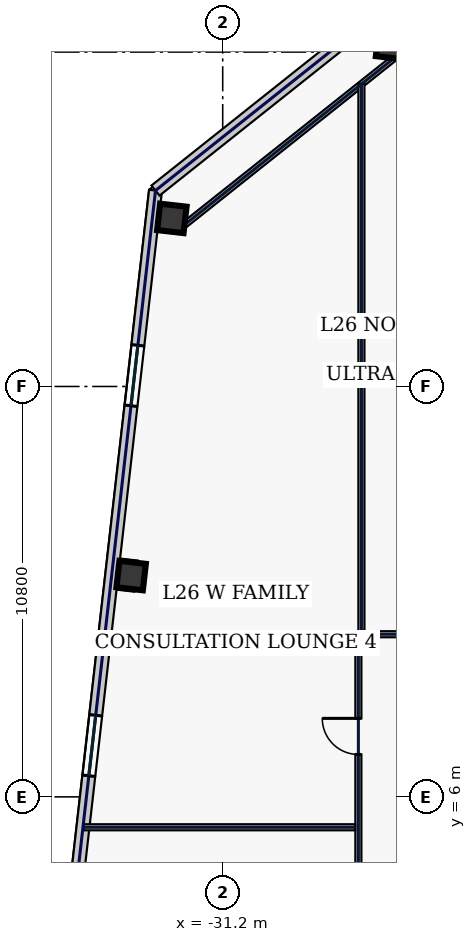
"""IFC4 building model, lengths in metres.
Left out: names, types, materials, properties, quantities, classifications, styles, units other than length and angle.
Written with IfcOpenShell. Run it as: python <this file> out.ifc"""

import sys

from ifc_helpers import new_model, si_unit, direction, frame, frame_2d, origin, origin_2d, place, context, subcontext, project, spatial, rectangle, hollow_rectangle, extrude, element, fill, save


model = new_model("IFC4")
c1 = context("Model", 3, precision=1e-05, world=origin(), true_north=direction((0.0, 1.0)))
c2 = subcontext(c1, "Body", "Model", "MODEL_VIEW")
j1 = project(units=[si_unit("LENGTHUNIT", "METRE"), si_unit("PLANEANGLEUNIT", "RADIAN")], contexts=[c1])
p1 = place(None, origin())
s1 = spatial("IfcSite", under=j1, at=p1, CompositionType="ELEMENT")
p2 = place(p1, origin())
s2 = spatial("IfcBuilding", under=s1, at=p2, CompositionType="ELEMENT")
p3 = place(p2, frame((0.0, 0.0, 117.4)))
s3 = spatial("IfcBuildingStorey", under=s2, at=p3, CompositionType="ELEMENT", Elevation=117.4)
for number, where, z_axis, x_axis in (
    (1, (-26.783, 25.801, 0.0), (0.0, 0.0, 1.0), (0.994, -0.113, 0.0)),
    (2, (-32.538, 21.223, 0.0), (0.0, 0.0, 1.0), (0.994, -0.113, 0.0)),
    (3, (-33.609, 11.824, 0.0), (0.0, 0.0, 1.0), (0.994, -0.113, 0.0)),
):
    element("IfcColumn", number, at=place(p3, frame(where, z_axis=z_axis, x_axis=x_axis)), inside=s3, PredefinedType="COLUMN", context=c2, shape_type="SweptSolid", body=[
        extrude(hollow_rectangle(XDim=0.7, YDim=0.7, WallThickness=0.032, at=origin_2d()), origin(), (0.0, 0.0, 1.0), 3.74),
    ])
p4 = place(p3, frame((-6.314, 23.982, 0.0), z_axis=(0.0, 0.0, 1.0), x_axis=(-0.993571362037, 0.113207546299, 0.0)))
e4 = element("IfcWall", 4, at=p4, inside=s3, PredefinedType="STANDARD", context=c2, shape_type="SweptSolid", body=[
    extrude(rectangle(XDim=21.223, YDim=0.34, at=frame_2d((10.611, 0.0))), origin(), (0.0, 0.0, 1.0), 3.74),
])
p5 = place(p4, frame((17.265, 0.0, 0.22)))
e5 = element("IfcOpeningElement", 5, at=p5, cuts=e4, PredefinedType="OPENING", context=c2, shape_type="SweptSolid", body=[
    extrude(rectangle(XDim=1.6, YDim=1.2, at=frame_2d((0.8, 0.6))), frame((0.0, 0.18, 0.0), z_axis=(0.0, -1.0, 0.0), x_axis=(1.0, 0.0, 0.0)), (0.0, 0.0, 1.0), 0.36),
])
p6 = place(p4, frame((12.794, 0.0, 0.67)))
e6 = element("IfcOpeningElement", 6, at=p6, cuts=e4, PredefinedType="OPENING", context=c2, shape_type="SweptSolid", body=[
    extrude(rectangle(XDim=2.1, YDim=2.2, at=frame_2d((1.05, 1.1))), frame((0.0, 0.18, 0.0), z_axis=(0.0, -1.0, 0.0), x_axis=(1.0, 0.0, 0.0)), (0.0, 0.0, 1.0), 0.36),
])
p7 = place(p4, frame((3.616, 0.0, 0.67)))
e7 = element("IfcOpeningElement", 7, at=p7, cuts=e4, PredefinedType="OPENING", context=c2, shape_type="SweptSolid", body=[
    extrude(rectangle(XDim=2.1, YDim=2.2, at=frame_2d((1.05, 1.1))), frame((0.0, 0.18, 0.0), z_axis=(0.0, -1.0, 0.0), x_axis=(1.0, 0.0, 0.0)), (0.0, 0.0, 1.0), 0.36),
])
p8 = place(p3, frame((-32.968, 21.957, 0.0), z_axis=(0.0, 0.0, 1.0), x_axis=(-0.113201605824, -0.993572038877, 0.0)))
e8 = element("IfcWall", 8, at=p8, inside=s3, PredefinedType="STANDARD", context=c2, shape_type="SweptSolid", body=[
    extrude(rectangle(XDim=39.2, YDim=0.34, at=frame_2d((19.6, 0.0))), origin(), (0.0, 0.0, 1.0), 3.74),
])
p9 = place(p8, frame((4.1, 0.0, 0.58)))
e9 = element("IfcOpeningElement", 9, at=p9, cuts=e8, PredefinedType="OPENING", context=c2, shape_type="SweptSolid", body=[
    extrude(rectangle(XDim=1.6, YDim=2.3, at=frame_2d((0.8, 1.15))), frame((0.0, 0.18, 0.0), z_axis=(0.0, -1.0, 0.0), x_axis=(1.0, 0.0, 0.0)), (0.0, 0.0, 1.0), 0.36),
])
p10 = place(p8, frame((13.9, 0.0, 0.58)))
e10 = element("IfcOpeningElement", 10, at=p10, cuts=e8, PredefinedType="OPENING", context=c2, shape_type="SweptSolid", body=[
    extrude(rectangle(XDim=1.6, YDim=2.3, at=frame_2d((0.8, 1.15))), frame((0.0, 0.18, 0.0), z_axis=(0.0, -1.0, 0.0), x_axis=(1.0, 0.0, 0.0)), (0.0, 0.0, 1.0), 0.36),
])
p11 = place(p8, frame((23.7, 0.0, 0.58)))
e11 = element("IfcOpeningElement", 11, at=p11, cuts=e8, PredefinedType="OPENING", context=c2, shape_type="SweptSolid", body=[
    extrude(rectangle(XDim=1.6, YDim=2.3, at=frame_2d((0.8, 1.15))), frame((0.0, 0.18, 0.0), z_axis=(0.0, -1.0, 0.0), x_axis=(1.0, 0.0, 0.0)), (0.0, 0.0, 1.0), 0.36),
])
p12 = place(p8, frame((33.5, 0.0, 0.58)))
e12 = element("IfcOpeningElement", 12, at=p12, cuts=e8, PredefinedType="OPENING", context=c2, shape_type="SweptSolid", body=[
    extrude(rectangle(XDim=1.6, YDim=2.3, at=frame_2d((0.8, 1.15))), frame((0.0, 0.18, 0.0), z_axis=(0.0, -1.0, 0.0), x_axis=(1.0, 0.0, 0.0)), (0.0, 0.0, 1.0), 0.36),
])
p13 = place(p3, frame((-27.401, 26.385, 0.0), z_axis=(0.0, 0.0, 1.0), x_axis=(-0.78261359446, -0.622507800567, 0.0)))
e13 = element("IfcWall", 13, at=p13, inside=s3, PredefinedType="STANDARD", context=c2, shape_type="SweptSolid", body=[
    extrude(rectangle(XDim=7.114, YDim=0.34, at=frame_2d((3.557, 0.0))), origin(), (0.0, 0.0, 1.0), 3.74),
])
p14 = place(p3, frame((-26.571, 25.535, 0.0), z_axis=(0.0, 0.0, 1.0), x_axis=(-0.782617962887, -0.622502308564, 0.0)))
e14 = element("IfcWall", 14, at=p14, inside=s3, PredefinedType="PARTITIONING", context=c2, shape_type="SweptSolid", body=[
    extrude(rectangle(XDim=7.354, YDim=0.16, at=frame_2d((3.677, 0.0))), origin(), (0.0, 0.0, 1.0), 3.74),
])
p15 = place(p3, frame((-27.63, -10.015, 0.0), z_axis=(0.0, 0.0, 1.0), x_axis=(0.0, 1.0, 0.0)))
e15 = element("IfcWall", 15, at=p15, inside=s3, PredefinedType="PARTITIONING", context=c2, shape_type="SweptSolid", body=[
    extrude(rectangle(XDim=20.13, YDim=0.16, at=frame_2d((10.065, 0.0))), origin(), (0.0, 0.0, 1.0), 3.74),
])
p16 = place(p15, frame((2.169, 0.0, 0.0)))
e16 = element("IfcOpeningElement", 16, at=p16, cuts=e15, PredefinedType="OPENING", context=c2, shape_type="SweptSolid", body=[
    extrude(rectangle(XDim=0.95, YDim=2.2, at=frame_2d((0.475, 1.1))), frame((0.0, 0.09, 0.0), z_axis=(0.0, -1.0, 0.0), x_axis=(1.0, 0.0, 0.0)), (0.0, 0.0, 1.0), 0.18),
])
p17 = place(p15, frame((7.025, 0.0, 0.0)))
e17 = element("IfcOpeningElement", 17, at=p17, cuts=e15, PredefinedType="OPENING", context=c2, shape_type="SweptSolid", body=[
    extrude(rectangle(XDim=0.95, YDim=2.2, at=frame_2d((0.475, 1.1))), frame((0.0, 0.09, 0.0), z_axis=(0.0, -1.0, 0.0), x_axis=(1.0, 0.0, 0.0)), (0.0, 0.0, 1.0), 0.18),
])
p18 = place(p15, frame((12.225, 0.0, 0.0)))
e18 = element("IfcOpeningElement", 18, at=p18, cuts=e15, PredefinedType="OPENING", context=c2, shape_type="SweptSolid", body=[
    extrude(rectangle(XDim=0.95, YDim=2.2, at=frame_2d((0.475, 1.1))), frame((0.0, 0.09, 0.0), z_axis=(0.0, -1.0, 0.0), x_axis=(1.0, 0.0, 0.0)), (0.0, 0.0, 1.0), 0.18),
])
p19 = place(p15, frame((17.131, 0.0, 0.0)))
e19 = element("IfcOpeningElement", 19, at=p19, cuts=e15, PredefinedType="OPENING", context=c2, shape_type="SweptSolid", body=[
    extrude(rectangle(XDim=0.95, YDim=2.2, at=frame_2d((0.475, 1.1))), frame((0.0, 0.09, 0.0), z_axis=(0.0, -1.0, 0.0), x_axis=(1.0, 0.0, 0.0)), (0.0, 0.0, 1.0), 0.18),
])
p20 = place(p3, frame((-27.465, 10.28, 0.0), z_axis=(0.0, 0.0, 1.0), x_axis=(1.0, 0.0, 0.0)))
e20 = element("IfcWall", 20, at=p20, inside=s3, PredefinedType="PARTITIONING", context=c2, shape_type="SweptSolid", body=[
    extrude(rectangle(XDim=54.93, YDim=0.16, at=frame_2d((27.465, 0.0))), origin(), (0.0, 0.0, 1.0), 3.74),
])
p21 = place(p20, frame((2.044, 0.0, 0.0)))
e21 = element("IfcOpeningElement", 21, at=p21, cuts=e20, PredefinedType="OPENING", context=c2, shape_type="SweptSolid", body=[
    extrude(rectangle(XDim=0.95, YDim=2.2, at=frame_2d((0.475, 1.1))), frame((0.0, 0.09, 0.0), z_axis=(0.0, -1.0, 0.0), x_axis=(1.0, 0.0, 0.0)), (0.0, 0.0, 1.0), 0.18),
])
p22 = place(p20, frame((8.075, 0.0, 0.0)))
e22 = element("IfcOpeningElement", 22, at=p22, cuts=e20, PredefinedType="OPENING", context=c2, shape_type="SweptSolid", body=[
    extrude(rectangle(XDim=0.95, YDim=2.2, at=frame_2d((0.475, 1.1))), frame((0.0, 0.09, 0.0), z_axis=(0.0, -1.0, 0.0), x_axis=(1.0, 0.0, 0.0)), (0.0, 0.0, 1.0), 0.18),
])
p23 = place(p20, frame((15.55, 0.0, 0.0)))
e23 = element("IfcOpeningElement", 23, at=p23, cuts=e20, PredefinedType="OPENING", context=c2, shape_type="SweptSolid", body=[
    extrude(rectangle(XDim=1.3, YDim=2.2, at=frame_2d((0.65, 1.1))), frame((0.0, 0.09, 0.0), z_axis=(0.0, -1.0, 0.0), x_axis=(1.0, 0.0, 0.0)), (0.0, 0.0, 1.0), 0.18),
])
p24 = place(p20, frame((23.775, 0.0, 0.0)))
e24 = element("IfcOpeningElement", 24, at=p24, cuts=e20, PredefinedType="OPENING", context=c2, shape_type="SweptSolid", body=[
    extrude(rectangle(XDim=1.05, YDim=2.2, at=frame_2d((0.525, 1.1))), frame((0.0, 0.09, 0.0), z_axis=(0.0, -1.0, 0.0), x_axis=(1.0, 0.0, 0.0)), (0.0, 0.0, 1.0), 0.18),
])
p25 = place(p20, frame((32.375, 0.0, 0.0)))
e25 = element("IfcOpeningElement", 25, at=p25, cuts=e20, PredefinedType="OPENING", context=c2, shape_type="SweptSolid", body=[
    extrude(rectangle(XDim=0.95, YDim=2.2, at=frame_2d((0.475, 1.1))), frame((0.0, 0.09, 0.0), z_axis=(0.0, -1.0, 0.0), x_axis=(1.0, 0.0, 0.0)), (0.0, 0.0, 1.0), 0.18),
])
p26 = place(p20, frame((39.795, 0.0, 0.0)))
e26 = element("IfcOpeningElement", 26, at=p26, cuts=e20, PredefinedType="OPENING", context=c2, shape_type="SweptSolid", body=[
    extrude(rectangle(XDim=1.45, YDim=2.2, at=frame_2d((0.725, 1.1))), frame((0.0, 0.09, 0.0), z_axis=(0.0, -1.0, 0.0), x_axis=(1.0, 0.0, 0.0)), (0.0, 0.0, 1.0), 0.18),
])
p27 = place(p20, frame((45.588, 0.0, 0.0)))
e27 = element("IfcOpeningElement", 27, at=p27, cuts=e20, PredefinedType="OPENING", context=c2, shape_type="SweptSolid", body=[
    extrude(rectangle(XDim=1.3, YDim=2.2, at=frame_2d((0.65, 1.1))), frame((0.0, 0.09, 0.0), z_axis=(0.0, -1.0, 0.0), x_axis=(1.0, 0.0, 0.0)), (0.0, 0.0, 1.0), 0.18),
])
p28 = place(p20, frame((51.074, 0.0, 0.0)))
e28 = element("IfcOpeningElement", 28, at=p28, cuts=e20, PredefinedType="OPENING", context=c2, shape_type="SweptSolid", body=[
    extrude(rectangle(XDim=1.3, YDim=2.2, at=frame_2d((0.65, 1.1))), frame((0.0, 0.09, 0.0), z_axis=(0.0, -1.0, 0.0), x_axis=(1.0, 0.0, 0.0)), (0.0, 0.0, 1.0), 0.18),
])
p29 = place(p3, frame((-27.55, 10.365, 0.0), z_axis=(0.0, 0.0, 1.0), x_axis=(0.0, 1.0, 0.0)))
e29 = element("IfcWall", 29, at=p29, inside=s3, PredefinedType="PARTITIONING", context=c2, shape_type="SweptSolid", body=[
    extrude(rectangle(XDim=14.409, YDim=0.16, at=frame_2d((7.204, 0.0))), origin(), (0.0, 0.0, 1.0), 3.74),
])
p30 = place(p3, frame((-34.857, 5.2, 0.0), z_axis=(0.0, 0.0, 1.0), x_axis=(1.0, 0.0, 0.0)))
e30 = element("IfcWall", 30, at=p30, inside=s3, PredefinedType="PARTITIONING", context=c2, shape_type="SweptSolid", body=[
    extrude(rectangle(XDim=7.142, YDim=0.16, at=frame_2d((3.571, 0.0))), origin(), (0.0, 0.0, 1.0), 3.74),
])
p31 = place(p9, origin())
e31 = element("IfcWindow", 31, at=p31, inside=s3, PartitioningType="SINGLE_PANEL", PredefinedType="WINDOW", context=c2, shape_type="SweptSolid", body=[
    extrude(rectangle(XDim=1.6, YDim=2.3, at=frame_2d((0.8, 1.15))), frame((0.0, 0.03, 0.0), z_axis=(0.0, -1.0, 0.0), x_axis=(1.0, 0.0, 0.0)), (0.0, 0.0, 1.0), 0.06),
])
fill(e9, e31)
p32 = place(p10, origin())
e32 = element("IfcWindow", 32, at=p32, inside=s3, PartitioningType="SINGLE_PANEL", PredefinedType="WINDOW", context=c2, shape_type="SweptSolid", body=[
    extrude(rectangle(XDim=1.6, YDim=2.3, at=frame_2d((0.8, 1.15))), frame((0.0, 0.03, 0.0), z_axis=(0.0, -1.0, 0.0), x_axis=(1.0, 0.0, 0.0)), (0.0, 0.0, 1.0), 0.06),
])
fill(e10, e32)
p33 = place(p19, origin())
e33 = element("IfcDoor", 33, at=p33, inside=s3, OperationType="SINGLE_SWING_RIGHT", PredefinedType="DOOR", context=c2, shape_type="SweptSolid", body=[
    extrude(rectangle(XDim=0.95, YDim=2.2, at=frame_2d((0.475, 1.1))), frame((0.0, 0.025, 0.0), z_axis=(0.0, -1.0, 0.0), x_axis=(1.0, 0.0, 0.0)), (0.0, 0.0, 1.0), 0.05),
])
fill(e19, e33)
save(model, sys.argv[1])
